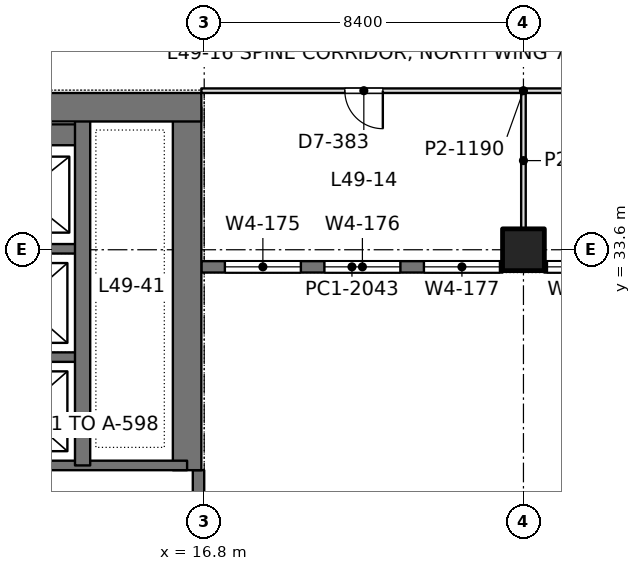
"""IFC4 building model, lengths in metres.
Left out: names, types, materials, properties, quantities, classifications, styles, units other than length and angle.
Written with IfcOpenShell. Run it as: python <this file> out.ifc"""

import sys

from ifc_helpers import new_model, si_unit, direction, frame, frame_2d, origin, origin_2d, place, context, subcontext, project, spatial, rectangle, extrude, element, fill, save


model = new_model("IFC4")
c1 = context("Model", 3, precision=1e-05, world=origin(), true_north=direction((0.0, 1.0)))
c2 = subcontext(c1, "Body", "Model", "MODEL_VIEW")
j1 = project(units=[si_unit("LENGTHUNIT", "METRE"), si_unit("PLANEANGLEUNIT", "RADIAN")], contexts=[c1])
p1 = place(None, origin())
s1 = spatial("IfcSite", under=j1, at=p1, CompositionType="ELEMENT")
p2 = place(p1, origin())
s2 = spatial("IfcBuilding", under=s1, at=p2, CompositionType="ELEMENT")
p3 = place(p2, frame((0.0, 0.0, 215.4)))
s3 = spatial("IfcBuildingStorey", under=s2, at=p3, CompositionType="ELEMENT", Elevation=215.4)
p4 = place(p3, frame((25.2, 33.6, 0.0), z_axis=(0.0, 0.0, 1.0), x_axis=(1.0, 0.0, 0.0)))
e1 = element("IfcColumn", 1, at=p4, inside=s3, PredefinedType="COLUMN", context=c2, shape_type="SweptSolid", body=[
    extrude(rectangle(XDim=1.1, YDim=1.1, at=origin_2d()), origin(), (0.0, 0.0, 1.0), 4.2),
])
p5 = place(p3, frame((-1.125, 37.35, 0.0), z_axis=(0.0, 0.0, 1.0), x_axis=(1.0, 0.0, 0.0)))
e2 = element("IfcWall", 2, at=p5, inside=s3, PredefinedType="SHEAR", context=c2, shape_type="SweptSolid", body=[
    extrude(rectangle(XDim=17.85, YDim=0.75, at=frame_2d((8.925, 0.0))), origin(), (0.0, 0.0, 1.0), 4.2),
])
p6 = place(p5, frame((8.875, 0.0, 0.0)))
e3 = element("IfcOpeningElement", 3, at=p6, cuts=e2, PredefinedType="OPENING", context=c2, shape_type="SweptSolid", body=[
    extrude(rectangle(XDim=1.8, YDim=2.4, at=frame_2d((0.9, 1.2))), frame((0.0, 0.385, 0.0), z_axis=(0.0, -1.0, 0.0), x_axis=(1.0, 0.0, 0.0)), (0.0, 0.0, 1.0), 0.77),
])
p7 = place(p3, frame((16.35, 27.8, 0.0), z_axis=(0.0, 0.0, 1.0), x_axis=(0.0, 1.0, 0.0)))
e4 = element("IfcWall", 4, at=p7, inside=s3, PredefinedType="SHEAR", context=c2, shape_type="SweptSolid", body=[
    extrude(rectangle(XDim=9.55, YDim=0.75, at=frame_2d((4.775, 0.0))), origin(), (0.0, 0.0, 1.0), 4.2),
])
p8 = place(p3, frame((13.6, 27.925, 0.0), z_axis=(0.0, 0.0, 1.0), x_axis=(0.0, 1.0, 0.0)))
e5 = element("IfcWall", 5, at=p8, inside=s3, PredefinedType="SHEAR", context=c2, shape_type="SweptSolid", body=[
    extrude(rectangle(XDim=9.425, YDim=0.4, at=frame_2d((4.712, 0.0))), origin(), (0.0, 0.0, 1.0), 4.2),
])
p9 = place(p3, frame((10.4, 27.925, 0.0), z_axis=(0.0, 0.0, 1.0), x_axis=(1.0, 0.0, 0.0)))
e6 = element("IfcWall", 6, at=p9, inside=s3, PredefinedType="SHEAR", context=c2, shape_type="SweptSolid", body=[
    extrude(rectangle(XDim=5.95, YDim=0.25, at=frame_2d((2.975, 0.0))), origin(), (0.0, 0.0, 1.0), 4.2),
])
for number, where, z_axis, x_axis in (
    (7, (10.4, 30.775, 0.0), (0.0, 0.0, 1.0), (1.0, 0.0, 0.0)),
    (8, (10.4, 33.625, 0.0), (0.0, 0.0, 1.0), (1.0, 0.0, 0.0)),
):
    element("IfcWall", number, at=place(p3, frame(where, z_axis=z_axis, x_axis=x_axis)), inside=s3, PredefinedType="SHEAR", context=c2, shape_type="SweptSolid", body=[
        extrude(rectangle(XDim=3.2, YDim=0.25, at=frame_2d((1.6, 0.0))), origin(), (0.0, 0.0, 1.0), 4.2),
    ])
p10 = place(p3, frame((10.4, 36.625, 0.0), z_axis=(0.0, 0.0, 1.0), x_axis=(1.0, 0.0, 0.0)))
e9 = element("IfcWall", 9, at=p10, inside=s3, PredefinedType="SHEAR", context=c2, shape_type="SweptSolid", body=[
    extrude(rectangle(XDim=3.2, YDim=0.55, at=frame_2d((1.6, 0.0))), origin(), (0.0, 0.0, 1.0), 4.2),
])
p11 = place(p3, frame((16.65, 17.1, 0.0), z_axis=(0.0, 0.0, 1.0), x_axis=(0.0, 1.0, 0.0)))
e10 = element("IfcWall", 10, at=p11, inside=s3, PredefinedType="SOLIDWALL", context=c2, shape_type="SweptSolid", body=[
    extrude(rectangle(XDim=10.7, YDim=0.3, at=frame_2d((5.35, 0.0))), origin(), (0.0, 0.0, 1.0), 4.05),
])
p12 = place(p11, frame((0.55, 0.0, 0.9)))
e11 = element("IfcOpeningElement", 11, at=p12, cuts=e10, PredefinedType="OPENING", context=c2, shape_type="SweptSolid", body=[
    extrude(rectangle(XDim=2.0, YDim=1.9, at=frame_2d((1.0, 0.95))), frame((0.0, 0.16, 0.0), z_axis=(0.0, -1.0, 0.0), x_axis=(1.0, 0.0, 0.0)), (0.0, 0.0, 1.0), 0.32),
])
p13 = place(p11, frame((2.9, 0.0, 0.9)))
e12 = element("IfcOpeningElement", 12, at=p13, cuts=e10, PredefinedType="OPENING", context=c2, shape_type="SweptSolid", body=[
    extrude(rectangle(XDim=2.0, YDim=1.9, at=frame_2d((1.0, 0.95))), frame((0.0, 0.16, 0.0), z_axis=(0.0, -1.0, 0.0), x_axis=(1.0, 0.0, 0.0)), (0.0, 0.0, 1.0), 0.32),
])
p14 = place(p11, frame((7.675, 0.0, 0.9)))
e13 = element("IfcOpeningElement", 13, at=p14, cuts=e10, PredefinedType="OPENING", context=c2, shape_type="SweptSolid", body=[
    extrude(rectangle(XDim=2.0, YDim=1.9, at=frame_2d((1.0, 0.95))), frame((0.0, 0.16, 0.0), z_axis=(0.0, -1.0, 0.0), x_axis=(1.0, 0.0, 0.0)), (0.0, 0.0, 1.0), 0.32),
])
p15 = place(p3, frame((16.725, 33.15, 0.0), z_axis=(0.0, 0.0, 1.0), x_axis=(1.0, 0.0, 0.0)))
e14 = element("IfcWall", 14, at=p15, inside=s3, PredefinedType="SOLIDWALL", context=c2, shape_type="SweptSolid", body=[
    extrude(rectangle(XDim=7.925, YDim=0.3, at=frame_2d((3.962, 0.0))), origin(), (0.0, 0.0, 1.0), 4.05),
])
p16 = place(p15, frame((0.619, 0.0, 0.9)))
e15 = element("IfcOpeningElement", 15, at=p16, cuts=e14, PredefinedType="OPENING", context=c2, shape_type="SweptSolid", body=[
    extrude(rectangle(XDim=2.0, YDim=1.9, at=frame_2d((1.0, 0.95))), frame((0.0, 0.16, 0.0), z_axis=(0.0, -1.0, 0.0), x_axis=(1.0, 0.0, 0.0)), (0.0, 0.0, 1.0), 0.32),
])
p17 = place(p15, frame((3.238, 0.0, 0.9)))
e16 = element("IfcOpeningElement", 16, at=p17, cuts=e14, PredefinedType="OPENING", context=c2, shape_type="SweptSolid", body=[
    extrude(rectangle(XDim=2.0, YDim=1.9, at=frame_2d((1.0, 0.95))), frame((0.0, 0.16, 0.0), z_axis=(0.0, -1.0, 0.0), x_axis=(1.0, 0.0, 0.0)), (0.0, 0.0, 1.0), 0.32),
])
p18 = place(p15, frame((5.856, 0.0, 0.9)))
e17 = element("IfcOpeningElement", 17, at=p18, cuts=e14, PredefinedType="OPENING", context=c2, shape_type="SweptSolid", body=[
    extrude(rectangle(XDim=2.0, YDim=1.9, at=frame_2d((1.0, 0.95))), frame((0.0, 0.16, 0.0), z_axis=(0.0, -1.0, 0.0), x_axis=(1.0, 0.0, 0.0)), (0.0, 0.0, 1.0), 0.32),
])
p19 = place(p3, frame((25.75, 33.15, 0.0), z_axis=(0.0, 0.0, 1.0), x_axis=(1.0, 0.0, 0.0)))
e18 = element("IfcWall", 18, at=p19, inside=s3, PredefinedType="SOLIDWALL", context=c2, shape_type="SweptSolid", body=[
    extrude(rectangle(XDim=7.925, YDim=0.3, at=frame_2d((3.962, 0.0))), origin(), (0.0, 0.0, 1.0), 4.05),
])
p20 = place(p19, frame((0.069, 0.0, 0.9)))
e19 = element("IfcOpeningElement", 19, at=p20, cuts=e18, PredefinedType="OPENING", context=c2, shape_type="SweptSolid", body=[
    extrude(rectangle(XDim=2.0, YDim=1.9, at=frame_2d((1.0, 0.95))), frame((0.0, 0.16, 0.0), z_axis=(0.0, -1.0, 0.0), x_axis=(1.0, 0.0, 0.0)), (0.0, 0.0, 1.0), 0.32),
])
p21 = place(p19, frame((2.688, 0.0, 0.9)))
e20 = element("IfcOpeningElement", 20, at=p21, cuts=e18, PredefinedType="OPENING", context=c2, shape_type="SweptSolid", body=[
    extrude(rectangle(XDim=2.0, YDim=1.9, at=frame_2d((1.0, 0.95))), frame((0.0, 0.16, 0.0), z_axis=(0.0, -1.0, 0.0), x_axis=(1.0, 0.0, 0.0)), (0.0, 0.0, 1.0), 0.32),
])
p22 = place(p19, frame((5.306, 0.0, 0.9)))
e21 = element("IfcOpeningElement", 21, at=p22, cuts=e18, PredefinedType="OPENING", context=c2, shape_type="SweptSolid", body=[
    extrude(rectangle(XDim=2.0, YDim=1.9, at=frame_2d((1.0, 0.95))), frame((0.0, 0.16, 0.0), z_axis=(0.0, -1.0, 0.0), x_axis=(1.0, 0.0, 0.0)), (0.0, 0.0, 1.0), 0.32),
])
p23 = place(p3, frame((25.2, 34.149, 0.0), z_axis=(0.0, 0.0, 1.0), x_axis=(0.0, 1.0, 0.0)))
e22 = element("IfcWall", 22, at=p23, inside=s3, PredefinedType="PARTITIONING", context=c2, shape_type="SweptSolid", body=[
    extrude(rectangle(XDim=3.593, YDim=0.12, at=frame_2d((1.796, 0.0))), origin(), (0.0, 0.0, 1.0), 3.55),
])
p24 = place(p3, frame((16.725, 37.785, 0.0), z_axis=(0.0, 0.0, 1.0), x_axis=(1.0, 0.0, 0.0)))
e23 = element("IfcWall", 23, at=p24, inside=s3, PredefinedType="PARTITIONING", context=c2, shape_type="SweptSolid", body=[
    extrude(rectangle(XDim=16.95, YDim=0.12, at=frame_2d((8.475, 0.0))), origin(), (0.0, 0.0, 1.0), 3.55),
])
p25 = place(p24, frame((3.775, 0.0, 0.0)))
e24 = element("IfcOpeningElement", 24, at=p25, cuts=e23, PredefinedType="OPENING", context=c2, shape_type="SweptSolid", body=[
    extrude(rectangle(XDim=1.0, YDim=2.4, at=frame_2d((0.5, 1.2))), frame((0.0, 0.07, 0.0), z_axis=(0.0, -1.0, 0.0), x_axis=(1.0, 0.0, 0.0)), (0.0, 0.0, 1.0), 0.14),
])
p26 = place(p24, frame((12.175, 0.0, 0.0)))
e25 = element("IfcOpeningElement", 25, at=p26, cuts=e23, PredefinedType="OPENING", context=c2, shape_type="SweptSolid", body=[
    extrude(rectangle(XDim=1.0, YDim=2.4, at=frame_2d((0.5, 1.2))), frame((0.0, 0.07, 0.0), z_axis=(0.0, -1.0, 0.0), x_axis=(1.0, 0.0, 0.0)), (0.0, 0.0, 1.0), 0.14),
])
p27 = place(p16, origin())
e26 = element("IfcWindow", 26, at=p27, inside=s3, PartitioningType="SINGLE_PANEL", PredefinedType="WINDOW", context=c2, shape_type="SweptSolid", body=[
    extrude(rectangle(XDim=2.0, YDim=1.9, at=frame_2d((1.0, 0.95))), frame((0.0, 0.03, 0.0), z_axis=(0.0, -1.0, 0.0), x_axis=(1.0, 0.0, 0.0)), (0.0, 0.0, 1.0), 0.06),
])
fill(e15, e26)
p28 = place(p17, origin())
e27 = element("IfcWindow", 27, at=p28, inside=s3, PartitioningType="SINGLE_PANEL", PredefinedType="WINDOW", context=c2, shape_type="SweptSolid", body=[
    extrude(rectangle(XDim=2.0, YDim=1.9, at=frame_2d((1.0, 0.95))), frame((0.0, 0.03, 0.0), z_axis=(0.0, -1.0, 0.0), x_axis=(1.0, 0.0, 0.0)), (0.0, 0.0, 1.0), 0.06),
])
fill(e16, e27)
p29 = place(p18, origin())
e28 = element("IfcWindow", 28, at=p29, inside=s3, PartitioningType="SINGLE_PANEL", PredefinedType="WINDOW", context=c2, shape_type="SweptSolid", body=[
    extrude(rectangle(XDim=2.0, YDim=1.9, at=frame_2d((1.0, 0.95))), frame((0.0, 0.03, 0.0), z_axis=(0.0, -1.0, 0.0), x_axis=(1.0, 0.0, 0.0)), (0.0, 0.0, 1.0), 0.06),
])
fill(e17, e28)
p30 = place(p20, origin())
e29 = element("IfcWindow", 29, at=p30, inside=s3, PartitioningType="SINGLE_PANEL", PredefinedType="WINDOW", context=c2, shape_type="SweptSolid", body=[
    extrude(rectangle(XDim=2.0, YDim=1.9, at=frame_2d((1.0, 0.95))), frame((0.0, 0.03, 0.0), z_axis=(0.0, -1.0, 0.0), x_axis=(1.0, 0.0, 0.0)), (0.0, 0.0, 1.0), 0.06),
])
fill(e19, e29)
p31 = place(p25, frame((1.0, 0.0, 0.0), z_axis=(0.0, 0.0, 1.0), x_axis=(-1.0, 0.0, 0.0)))
e30 = element("IfcDoor", 30, at=p31, inside=s3, OperationType="SINGLE_SWING_LEFT", PredefinedType="DOOR", context=c2, shape_type="SweptSolid", body=[
    extrude(rectangle(XDim=1.0, YDim=2.4, at=frame_2d((0.5, 1.2))), frame((0.0, 0.025, 0.0), z_axis=(0.0, -1.0, 0.0), x_axis=(1.0, 0.0, 0.0)), (0.0, 0.0, 1.0), 0.05),
])
fill(e24, e30)
save(model, sys.argv[1])
